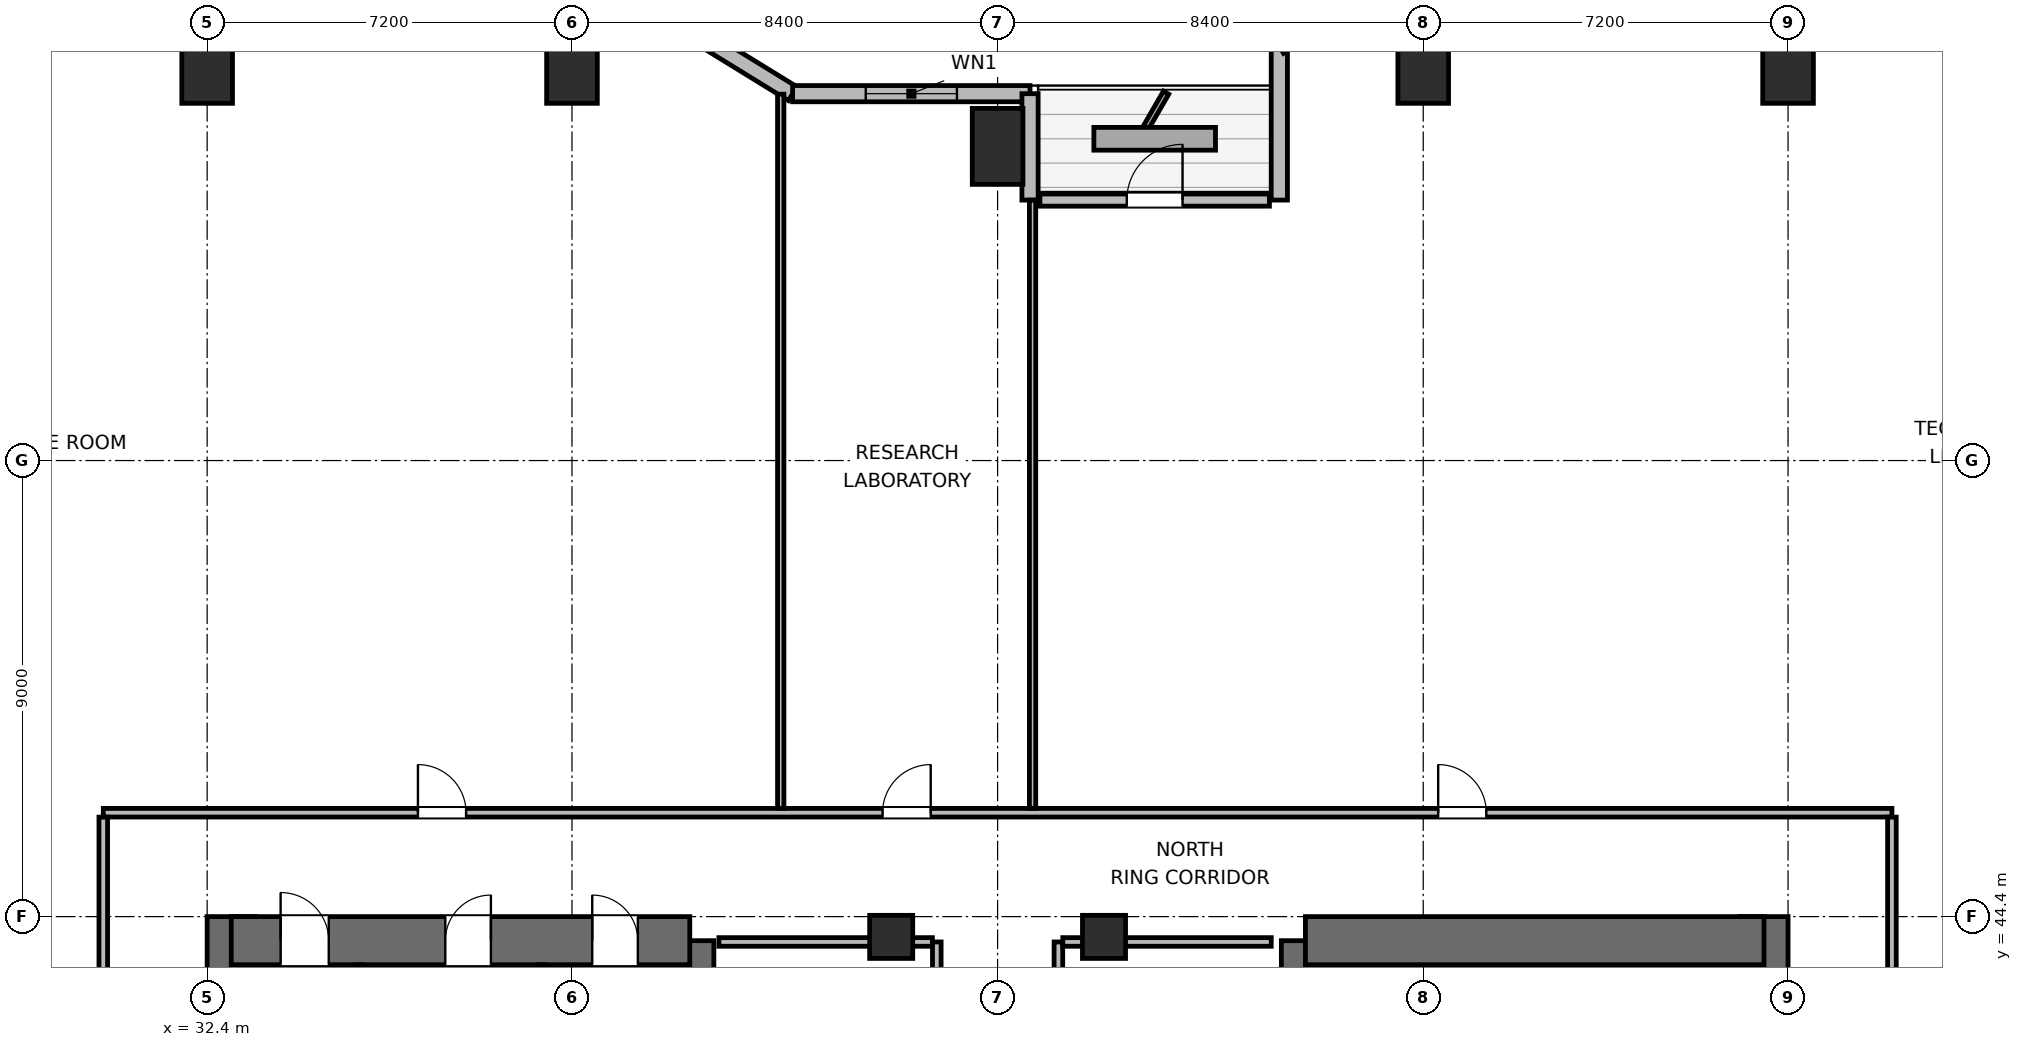
"""IFC4 building model, lengths in metres.
Left out: names, types, materials, properties, quantities, classifications, styles, units other than length and angle.
Written with IfcOpenShell. Run it as: python <this file> out.ifc"""

import sys

from ifc_helpers import new_model, si_unit, direction, frame, frame_2d, origin, origin_2d, place, context, subcontext, project, spatial, rectangle, extrude, element, fill, save


model = new_model("IFC4")
c1 = context("Model", 3, precision=1e-05, world=origin(), true_north=direction((0.0, 1.0)))
c2 = subcontext(c1, "Body", "Model", "MODEL_VIEW")
j1 = project(units=[si_unit("LENGTHUNIT", "METRE"), si_unit("PLANEANGLEUNIT", "RADIAN")], contexts=[c1])
p1 = place(None, origin())
s1 = spatial("IfcSite", under=j1, at=p1, CompositionType="ELEMENT")
p2 = place(p1, origin())
s2 = spatial("IfcBuilding", under=s1, at=p2, CompositionType="ELEMENT")
p3 = place(p2, frame((0.0, 0.0, 25.5)))
s3 = spatial("IfcBuildingStorey", under=s2, at=p3, CompositionType="ELEMENT", Elevation=25.5)
p4 = place(p3, frame((32.875, 27.6, 0.0), z_axis=(0.0, 0.0, 1.0), x_axis=(0.0, 1.0, 0.0)))
e1 = element("IfcWall", 1, at=p4, inside=s3, PredefinedType="SHEAR", context=c2, shape_type="SweptSolid", body=[
    extrude(rectangle(XDim=16.8, YDim=0.95, at=frame_2d((8.4, 0.0))), origin(), (0.0, 0.0, 1.0), 3.9),
])
p5 = place(p3, frame((41.925, 37.8, 0.0), z_axis=(0.0, 0.0, 1.0), x_axis=(0.0, 1.0, 0.0)))
e2 = element("IfcWall", 2, at=p5, inside=s3, PredefinedType="SHEAR", context=c2, shape_type="SweptSolid", body=[
    extrude(rectangle(XDim=6.125, YDim=0.95, at=frame_2d((3.062, 0.0))), origin(), (0.0, 0.0, 1.0), 3.9),
])
p6 = place(p3, frame((32.875, 43.925, 0.0), z_axis=(0.0, 0.0, 1.0), x_axis=(1.0, 0.0, 0.0)))
e3 = element("IfcWall", 3, at=p6, inside=s3, PredefinedType="SHEAR", context=c2, shape_type="SweptSolid", body=[
    extrude(rectangle(XDim=9.05, YDim=0.95, at=frame_2d((4.525, 0.0))), origin(), (0.0, 0.0, 1.0), 3.9),
])
p7 = place(p6, frame((0.975, 0.0, 0.0)))
e4 = element("IfcOpeningElement", 4, at=p7, cuts=e3, PredefinedType="OPENING", context=c2, shape_type="SweptSolid", body=[
    extrude(rectangle(XDim=0.95, YDim=2.04, at=frame_2d((0.475, 1.02))), frame((0.0, 0.485, 0.0), z_axis=(0.0, -1.0, 0.0), x_axis=(1.0, 0.0, 0.0)), (0.0, 0.0, 1.0), 0.97),
])
p8 = place(p6, frame((4.225, 0.0, 0.0)))
e5 = element("IfcOpeningElement", 5, at=p8, cuts=e3, PredefinedType="OPENING", context=c2, shape_type="SweptSolid", body=[
    extrude(rectangle(XDim=0.9, YDim=2.02, at=frame_2d((0.45, 1.01))), frame((0.0, 0.485, 0.0), z_axis=(0.0, -1.0, 0.0), x_axis=(1.0, 0.0, 0.0)), (0.0, 0.0, 1.0), 0.97),
])
p9 = place(p6, frame((7.125, 0.0, 0.0)))
e6 = element("IfcOpeningElement", 6, at=p9, cuts=e3, PredefinedType="OPENING", context=c2, shape_type="SweptSolid", body=[
    extrude(rectangle(XDim=0.9, YDim=2.02, at=frame_2d((0.45, 1.01))), frame((0.0, 0.485, 0.0), z_axis=(0.0, -1.0, 0.0), x_axis=(1.0, 0.0, 0.0)), (0.0, 0.0, 1.0), 0.97),
])
p10 = place(p3, frame((54.075, 38.0, 0.0), z_axis=(0.0, 0.0, 1.0), x_axis=(0.0, 1.0, 0.0)))
e7 = element("IfcWall", 7, at=p10, inside=s3, PredefinedType="SHEAR", context=c2, shape_type="SweptSolid", body=[
    extrude(rectangle(XDim=5.925, YDim=0.95, at=frame_2d((2.962, 0.0))), origin(), (0.0, 0.0, 1.0), 3.9),
])
p11 = place(p3, frame((63.125, 27.6, 0.0), z_axis=(0.0, 0.0, 1.0), x_axis=(0.0, 1.0, 0.0)))
e8 = element("IfcWall", 8, at=p11, inside=s3, PredefinedType="SHEAR", context=c2, shape_type="SweptSolid", body=[
    extrude(rectangle(XDim=16.8, YDim=0.95, at=frame_2d((8.4, 0.0))), origin(), (0.0, 0.0, 1.0), 3.9),
])
p12 = place(p3, frame((54.075, 43.925, 0.0), z_axis=(0.0, 0.0, 1.0), x_axis=(1.0, 0.0, 0.0)))
e9 = element("IfcWall", 9, at=p12, inside=s3, PredefinedType="SHEAR", context=c2, shape_type="SweptSolid", body=[
    extrude(rectangle(XDim=9.05, YDim=0.95, at=frame_2d((4.525, 0.0))), origin(), (0.0, 0.0, 1.0), 3.9),
])
for number, where, z_axis, x_axis in (
    (10, (32.4, 61.2, 0.0), (0.0, 0.0, 1.0), (1.0, 0.0, 0.0)),
    (11, (39.6, 61.2, 0.0), (0.0, 0.0, 1.0), (1.0, 0.0, 0.0)),
    (12, (48.0, 59.6, 0.0), (0.0, 0.0, 1.0), (1.0, 0.0, 0.0)),
    (13, (56.4, 61.2, 0.0), (0.0, 0.0, 1.0), (1.0, 0.0, 0.0)),
    (14, (63.6, 61.2, 0.0), (0.0, 0.0, 1.0), (1.0, 0.0, 0.0)),
):
    element("IfcColumn", number, at=place(p3, frame(where, z_axis=z_axis, x_axis=x_axis)), inside=s3, PredefinedType="COLUMN", context=c2, shape_type="SweptSolid", body=[
        extrude(rectangle(XDim=1.0, YDim=1.5, at=origin_2d()), origin(), (0.0, 0.0, 1.0), 3.9),
    ])
for number, where, z_axis, x_axis in (
    (15, (45.9, 44.0, 0.0), (0.0, 0.0, 1.0), (1.0, 0.0, 0.0)),
    (16, (50.1, 44.0, 0.0), (0.0, 0.0, 1.0), (1.0, 0.0, 0.0)),
):
    element("IfcColumn", number, at=place(p3, frame(where, z_axis=z_axis, x_axis=x_axis)), inside=s3, PredefinedType="COLUMN", context=c2, shape_type="SweptSolid", body=[
        extrude(rectangle(XDim=0.85, YDim=0.85, at=origin_2d()), origin(), (0.0, 0.0, 1.0), 3.9),
    ])
p13 = place(p3, frame((41.355, 62.24, 0.0), z_axis=(0.0, 0.0, 1.0), x_axis=(0.851630857047, -0.524142044989, 0.0)))
e17 = element("IfcWall", 17, at=p13, inside=s3, PredefinedType="SOLIDWALL", context=c2, shape_type="SweptSolid", body=[
    extrude(rectangle(XDim=3.053, YDim=0.32, at=frame_2d((1.526, 0.0))), origin(), (0.0, 0.0, 1.0), 2.875),
])
p14 = place(p3, frame((43.955, 60.64, 0.0), z_axis=(0.0, 0.0, 1.0), x_axis=(1.0, 0.0, 0.0)))
e18 = element("IfcWall", 18, at=p14, inside=s3, PredefinedType="SOLIDWALL", context=c2, shape_type="SweptSolid", body=[
    extrude(rectangle(XDim=4.685, YDim=0.32, at=frame_2d((2.343, 0.0))), origin(), (0.0, 0.0, 1.0), 2.875),
])
p15 = place(p14, frame((1.443, 0.0, 0.85)))
e19 = element("IfcOpeningElement", 19, at=p15, cuts=e18, PredefinedType="OPENING", context=c2, shape_type="SweptSolid", body=[
    extrude(rectangle(XDim=1.8, YDim=1.1, at=frame_2d((0.9, 0.55))), frame((0.0, 0.17, 0.0), z_axis=(0.0, -1.0, 0.0), x_axis=(1.0, 0.0, 0.0)), (0.0, 0.0, 1.0), 0.34),
])
p16 = place(p3, frame((48.64, 60.64, 0.0), z_axis=(0.0, 0.0, 1.0), x_axis=(0.0, -1.0, 0.0)))
e20 = element("IfcWall", 20, at=p16, inside=s3, PredefinedType="SOLIDWALL", context=c2, shape_type="SweptSolid", body=[
    extrude(rectangle(XDim=2.1, YDim=0.32, at=frame_2d((1.05, 0.0))), origin(), (0.0, 0.0, 1.0), 2.875),
])
p17 = place(p3, frame((48.835, 58.54, 0.0), z_axis=(0.0, 0.0, 1.0), x_axis=(1.0, 0.0, 0.0)))
e21 = element("IfcWall", 21, at=p17, inside=s3, PredefinedType="SOLIDWALL", context=c2, shape_type="SweptSolid", body=[
    extrude(rectangle(XDim=4.53, YDim=0.24, at=frame_2d((2.265, 0.0))), origin(), (0.0, 0.0, 1.0), 3.64),
])
p18 = place(p17, frame((1.715, 0.0, 0.0)))
e22 = element("IfcOpeningElement", 22, at=p18, cuts=e21, PredefinedType="OPENING", context=c2, shape_type="SweptSolid", body=[
    extrude(rectangle(XDim=1.1, YDim=2.04, at=frame_2d((0.55, 1.02))), frame((0.0, 0.13, 0.0), z_axis=(0.0, -1.0, 0.0), x_axis=(1.0, 0.0, 0.0)), (0.0, 0.0, 1.0), 0.26),
])
p19 = place(p3, frame((53.56, 58.54, 0.0), z_axis=(0.0, 0.0, 1.0), x_axis=(0.0, 1.0, 0.0)))
e23 = element("IfcWall", 23, at=p19, inside=s3, PredefinedType="SOLIDWALL", context=c2, shape_type="SweptSolid", body=[
    extrude(rectangle(XDim=3.032, YDim=0.32, at=frame_2d((1.516, 0.0))), origin(), (0.0, 0.0, 1.0), 2.875),
])
p20 = place(p3, frame((53.56, 61.573, 0.0), z_axis=(0.0, 0.0, 1.0), x_axis=(0.851776724646, 0.523904964045, 0.0)))
e24 = element("IfcWall", 24, at=p20, inside=s3, PredefinedType="SOLIDWALL", context=c2, shape_type="SweptSolid", body=[
    extrude(rectangle(XDim=1.274, YDim=0.32, at=frame_2d((0.637, 0.0))), origin(), (0.0, 0.0, 1.0), 3.64),
])
for number, where, z_axis, x_axis in (
    (25, (35.4, 41.095, 0.0), (0.0, 0.0, 1.0), (0.0, 1.0, 0.0)),
    (26, (39.0, 41.095, 0.0), (0.0, 0.0, 1.0), (0.0, 1.0, 0.0)),
):
    element("IfcWall", number, at=place(p3, frame(where, z_axis=z_axis, x_axis=x_axis)), inside=s3, PredefinedType="PARTITIONING", context=c2, shape_type="SweptSolid", body=[
        extrude(rectangle(XDim=2.355, YDim=0.125, at=frame_2d((1.177, 0.0))), origin(), (0.0, 0.0, 1.0), 3.64),
    ])
p21 = place(p3, frame((46.8, 37.9, 0.0), z_axis=(0.0, 0.0, 1.0), x_axis=(0.0, 1.0, 0.0)))
e27 = element("IfcWall", 27, at=p21, inside=s3, PredefinedType="PARTITIONING", context=c2, shape_type="SweptSolid", body=[
    extrude(rectangle(XDim=6.0, YDim=0.17, at=frame_2d((3.0, 0.0))), origin(), (0.0, 0.0, 1.0), 3.64),
])
p22 = place(p21, frame((1.47, 0.0, 0.0)))
e28 = element("IfcOpeningElement", 28, at=p22, cuts=e27, PredefinedType="OPENING", context=c2, shape_type="SweptSolid", body=[
    extrude(rectangle(XDim=0.9, YDim=2.02, at=frame_2d((0.45, 1.01))), frame((0.0, 0.095, 0.0), z_axis=(0.0, -1.0, 0.0), x_axis=(1.0, 0.0, 0.0)), (0.0, 0.0, 1.0), 0.19),
])
p23 = place(p21, frame((4.47, 0.0, 0.0)))
e29 = element("IfcOpeningElement", 29, at=p23, cuts=e27, PredefinedType="OPENING", context=c2, shape_type="SweptSolid", body=[
    extrude(rectangle(XDim=0.9, YDim=2.02, at=frame_2d((0.45, 1.01))), frame((0.0, 0.095, 0.0), z_axis=(0.0, -1.0, 0.0), x_axis=(1.0, 0.0, 0.0)), (0.0, 0.0, 1.0), 0.19),
])
p24 = place(p3, frame((42.5, 43.9, 0.0), z_axis=(0.0, 0.0, 1.0), x_axis=(1.0, 0.0, 0.0)))
e30 = element("IfcWall", 30, at=p24, inside=s3, PredefinedType="PARTITIONING", context=c2, shape_type="SweptSolid", body=[
    extrude(rectangle(XDim=4.213, YDim=0.17, at=frame_2d((2.106, 0.0))), origin(), (0.0, 0.0, 1.0), 2.525),
])
p25 = place(p3, frame((49.2, 37.9, 0.0), z_axis=(0.0, 0.0, 1.0), x_axis=(0.0, 1.0, 0.0)))
e31 = element("IfcWall", 31, at=p25, inside=s3, PredefinedType="PARTITIONING", context=c2, shape_type="SweptSolid", body=[
    extrude(rectangle(XDim=6.0, YDim=0.17, at=frame_2d((3.0, 0.0))), origin(), (0.0, 0.0, 1.0), 3.64),
])
p26 = place(p25, frame((2.55, 0.0, 0.0)))
e32 = element("IfcOpeningElement", 32, at=p26, cuts=e31, PredefinedType="OPENING", context=c2, shape_type="SweptSolid", body=[
    extrude(rectangle(XDim=0.9, YDim=2.02, at=frame_2d((0.45, 1.01))), frame((0.0, 0.095, 0.0), z_axis=(0.0, -1.0, 0.0), x_axis=(1.0, 0.0, 0.0)), (0.0, 0.0, 1.0), 0.19),
])
p27 = place(p3, frame((49.287, 43.9, 0.0), z_axis=(0.0, 0.0, 1.0), x_axis=(1.0, 0.0, 0.0)))
e33 = element("IfcWall", 33, at=p27, inside=s3, PredefinedType="PARTITIONING", context=c2, shape_type="SweptSolid", body=[
    extrude(rectangle(XDim=4.113, YDim=0.17, at=frame_2d((2.056, 0.0))), origin(), (0.0, 0.0, 1.0), 2.525),
])
p28 = place(p3, frame((30.35, 46.45, 0.0), z_axis=(0.0, 0.0, 1.0), x_axis=(1.0, 0.0, 0.0)))
e34 = element("IfcWall", 34, at=p28, inside=s3, PredefinedType="PARTITIONING", context=c2, shape_type="SweptSolid", body=[
    extrude(rectangle(XDim=35.3, YDim=0.17, at=frame_2d((17.65, 0.0))), origin(), (0.0, 0.0, 1.0), 3.64),
])
p29 = place(p28, frame((6.21, 0.0, 0.0)))
e35 = element("IfcOpeningElement", 35, at=p29, cuts=e34, PredefinedType="OPENING", context=c2, shape_type="SweptSolid", body=[
    extrude(rectangle(XDim=0.95, YDim=2.04, at=frame_2d((0.475, 1.02))), frame((0.0, 0.095, 0.0), z_axis=(0.0, -1.0, 0.0), x_axis=(1.0, 0.0, 0.0)), (0.0, 0.0, 1.0), 0.19),
])
p30 = place(p28, frame((15.38, 0.0, 0.0)))
e36 = element("IfcOpeningElement", 36, at=p30, cuts=e34, PredefinedType="OPENING", context=c2, shape_type="SweptSolid", body=[
    extrude(rectangle(XDim=0.95, YDim=2.04, at=frame_2d((0.475, 1.02))), frame((0.0, 0.095, 0.0), z_axis=(0.0, -1.0, 0.0), x_axis=(1.0, 0.0, 0.0)), (0.0, 0.0, 1.0), 0.19),
])
p31 = place(p28, frame((26.345, 0.0, 0.0)))
e37 = element("IfcOpeningElement", 37, at=p31, cuts=e34, PredefinedType="OPENING", context=c2, shape_type="SweptSolid", body=[
    extrude(rectangle(XDim=0.95, YDim=2.04, at=frame_2d((0.475, 1.02))), frame((0.0, 0.095, 0.0), z_axis=(0.0, -1.0, 0.0), x_axis=(1.0, 0.0, 0.0)), (0.0, 0.0, 1.0), 0.19),
])
p32 = place(p3, frame((30.35, 25.637, 0.0), z_axis=(0.0, 0.0, 1.0), x_axis=(0.0, 1.0, 0.0)))
e38 = element("IfcWall", 38, at=p32, inside=s3, PredefinedType="PARTITIONING", context=c2, shape_type="SweptSolid", body=[
    extrude(rectangle(XDim=20.726, YDim=0.17, at=frame_2d((10.363, 0.0))), origin(), (0.0, 0.0, 1.0), 3.64),
])
p33 = place(p32, frame((4.263, 0.0, 0.0)))
e39 = element("IfcOpeningElement", 39, at=p33, cuts=e38, PredefinedType="OPENING", context=c2, shape_type="SweptSolid", body=[
    extrude(rectangle(XDim=0.95, YDim=2.04, at=frame_2d((0.475, 1.02))), frame((0.0, 0.095, 0.0), z_axis=(0.0, -1.0, 0.0), x_axis=(1.0, 0.0, 0.0)), (0.0, 0.0, 1.0), 0.19),
])
p34 = place(p32, frame((14.713, 0.0, 0.0)))
e40 = element("IfcOpeningElement", 40, at=p34, cuts=e38, PredefinedType="OPENING", context=c2, shape_type="SweptSolid", body=[
    extrude(rectangle(XDim=0.95, YDim=2.04, at=frame_2d((0.475, 1.02))), frame((0.0, 0.095, 0.0), z_axis=(0.0, -1.0, 0.0), x_axis=(1.0, 0.0, 0.0)), (0.0, 0.0, 1.0), 0.19),
])
p35 = place(p3, frame((65.65, 25.637, 0.0), z_axis=(0.0, 0.0, 1.0), x_axis=(0.0, 1.0, 0.0)))
e41 = element("IfcWall", 41, at=p35, inside=s3, PredefinedType="PARTITIONING", context=c2, shape_type="SweptSolid", body=[
    extrude(rectangle(XDim=20.726, YDim=0.17, at=frame_2d((10.363, 0.0))), origin(), (0.0, 0.0, 1.0), 3.64),
])
p36 = place(p35, frame((4.163, 0.0, 0.0)))
e42 = element("IfcOpeningElement", 42, at=p36, cuts=e41, PredefinedType="OPENING", context=c2, shape_type="SweptSolid", body=[
    extrude(rectangle(XDim=0.95, YDim=2.04, at=frame_2d((0.475, 1.02))), frame((0.0, 0.095, 0.0), z_axis=(0.0, -1.0, 0.0), x_axis=(1.0, 0.0, 0.0)), (0.0, 0.0, 1.0), 0.19),
])
p37 = place(p35, frame((14.613, 0.0, 0.0)))
e43 = element("IfcOpeningElement", 43, at=p37, cuts=e41, PredefinedType="OPENING", context=c2, shape_type="SweptSolid", body=[
    extrude(rectangle(XDim=0.95, YDim=2.04, at=frame_2d((0.475, 1.02))), frame((0.0, 0.095, 0.0), z_axis=(0.0, -1.0, 0.0), x_axis=(1.0, 0.0, 0.0)), (0.0, 0.0, 1.0), 0.19),
])
p38 = place(p3, frame((43.72, 46.537, 0.0), z_axis=(0.0, 0.0, 1.0), x_axis=(0.0, 1.0, 0.0)))
e44 = element("IfcWall", 44, at=p38, inside=s3, PredefinedType="PARTITIONING", context=c2, shape_type="SweptSolid", body=[
    extrude(rectangle(XDim=14.093, YDim=0.125, at=frame_2d((7.046, 0.0))), origin(), (0.0, 0.0, 1.0), 3.003),
])
p39 = place(p3, frame((48.69, 46.537, 0.0), z_axis=(0.0, 0.0, 1.0), x_axis=(0.0, 1.0, 0.0)))
e45 = element("IfcWall", 45, at=p39, inside=s3, PredefinedType="PARTITIONING", context=c2, shape_type="SweptSolid", body=[
    extrude(rectangle(XDim=12.003, YDim=0.125, at=frame_2d((6.001, 0.0))), origin(), (0.0, 0.0, 1.0), 3.64),
])
p40 = place(p15, origin())
e46 = element("IfcWindow", 46, at=p40, inside=s3, PartitioningType="SINGLE_PANEL", PredefinedType="WINDOW", context=c2, shape_type="SweptSolid", body=[
    extrude(rectangle(XDim=1.8, YDim=1.1, at=frame_2d((0.9, 0.55))), frame((0.0, 0.03, 0.0), z_axis=(0.0, -1.0, 0.0), x_axis=(1.0, 0.0, 0.0)), (0.0, 0.0, 1.0), 0.06),
])
fill(e19, e46)
p41 = place(p18, origin())
e47 = element("IfcDoor", 47, at=p41, inside=s3, OperationType="SINGLE_SWING_RIGHT", PredefinedType="DOOR", context=c2, shape_type="SweptSolid", body=[
    extrude(rectangle(XDim=1.1, YDim=2.04, at=frame_2d((0.55, 1.02))), frame((0.0, 0.025, 0.0), z_axis=(0.0, -1.0, 0.0), x_axis=(1.0, 0.0, 0.0)), (0.0, 0.0, 1.0), 0.05),
])
fill(e22, e47)
p42 = place(p7, origin())
e48 = element("IfcDoor", 48, at=p42, inside=s3, OperationType="SINGLE_SWING_LEFT", PredefinedType="DOOR", context=c2, shape_type="SweptSolid", body=[
    extrude(rectangle(XDim=0.95, YDim=2.04, at=frame_2d((0.475, 1.02))), frame((0.0, 0.025, 0.0), z_axis=(0.0, -1.0, 0.0), x_axis=(1.0, 0.0, 0.0)), (0.0, 0.0, 1.0), 0.05),
])
fill(e4, e48)
p43 = place(p8, origin())
e49 = element("IfcDoor", 49, at=p43, inside=s3, OperationType="SINGLE_SWING_RIGHT", PredefinedType="DOOR", context=c2, shape_type="SweptSolid", body=[
    extrude(rectangle(XDim=0.9, YDim=2.02, at=frame_2d((0.45, 1.01))), frame((0.0, 0.025, 0.0), z_axis=(0.0, -1.0, 0.0), x_axis=(1.0, 0.0, 0.0)), (0.0, 0.0, 1.0), 0.05),
])
fill(e5, e49)
p44 = place(p9, origin())
e50 = element("IfcDoor", 50, at=p44, inside=s3, OperationType="SINGLE_SWING_LEFT", PredefinedType="DOOR", context=c2, shape_type="SweptSolid", body=[
    extrude(rectangle(XDim=0.9, YDim=2.02, at=frame_2d((0.45, 1.01))), frame((0.0, 0.025, 0.0), z_axis=(0.0, -1.0, 0.0), x_axis=(1.0, 0.0, 0.0)), (0.0, 0.0, 1.0), 0.05),
])
fill(e6, e50)
p45 = place(p29, origin())
e51 = element("IfcDoor", 51, at=p45, inside=s3, OperationType="SINGLE_SWING_LEFT", PredefinedType="DOOR", context=c2, shape_type="SweptSolid", body=[
    extrude(rectangle(XDim=0.95, YDim=2.04, at=frame_2d((0.475, 1.02))), frame((0.0, 0.025, 0.0), z_axis=(0.0, -1.0, 0.0), x_axis=(1.0, 0.0, 0.0)), (0.0, 0.0, 1.0), 0.05),
])
fill(e35, e51)
p46 = place(p30, origin())
e52 = element("IfcDoor", 52, at=p46, inside=s3, OperationType="SINGLE_SWING_RIGHT", PredefinedType="DOOR", context=c2, shape_type="SweptSolid", body=[
    extrude(rectangle(XDim=0.95, YDim=2.04, at=frame_2d((0.475, 1.02))), frame((0.0, 0.025, 0.0), z_axis=(0.0, -1.0, 0.0), x_axis=(1.0, 0.0, 0.0)), (0.0, 0.0, 1.0), 0.05),
])
fill(e36, e52)
p47 = place(p31, origin())
e53 = element("IfcDoor", 53, at=p47, inside=s3, OperationType="SINGLE_SWING_LEFT", PredefinedType="DOOR", context=c2, shape_type="SweptSolid", body=[
    extrude(rectangle(XDim=0.95, YDim=2.04, at=frame_2d((0.475, 1.02))), frame((0.0, 0.025, 0.0), z_axis=(0.0, -1.0, 0.0), x_axis=(1.0, 0.0, 0.0)), (0.0, 0.0, 1.0), 0.05),
])
fill(e37, e53)
save(model, sys.argv[1])
